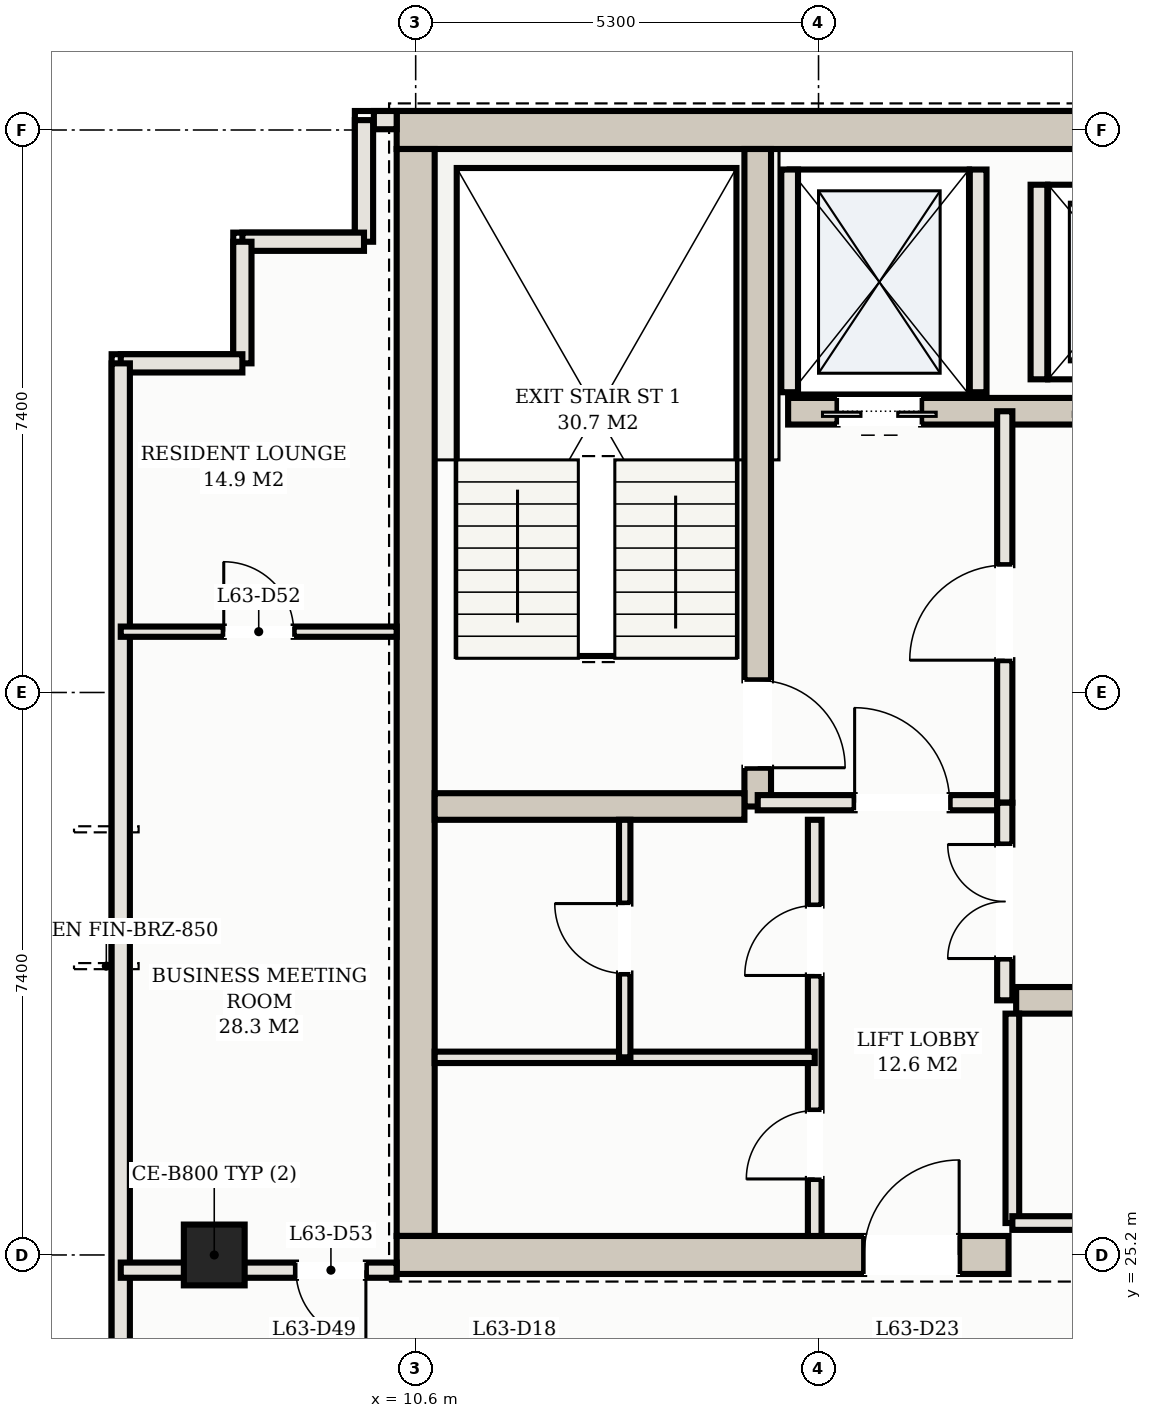
"""IFC4 building model, lengths in metres.
Left out: names, types, materials, properties, quantities, classifications, styles, units other than length and angle.
Written with IfcOpenShell. Run it as: python <this file> out.ifc"""

import sys

from ifc_helpers import new_model, si_unit, direction, frame, frame_2d, origin, origin_2d, place, context, subcontext, project, spatial, rectangle, hollow_rectangle, extrude, element, fill, save


model = new_model("IFC4")
c1 = context("Model", 3, precision=1e-05, world=origin(), true_north=direction((0.0, 1.0)))
c2 = subcontext(c1, "Body", "Model", "MODEL_VIEW")
j1 = project(units=[si_unit("LENGTHUNIT", "METRE"), si_unit("PLANEANGLEUNIT", "RADIAN")], contexts=[c1])
p1 = place(None, origin())
s1 = spatial("IfcSite", under=j1, at=p1, CompositionType="ELEMENT")
p2 = place(p1, origin())
s2 = spatial("IfcBuilding", under=s1, at=p2, CompositionType="ELEMENT")
p3 = place(p2, frame((0.0, 0.0, 229.7)))
s3 = spatial("IfcBuildingStorey", under=s2, at=p3, CompositionType="ELEMENT", Elevation=229.7)
p4 = place(p3, frame((10.35, 40.0, 0.0), z_axis=(0.0, 0.0, 1.0), x_axis=(1.0, 0.0, 0.0)))
e1 = element("IfcWall", 1, at=p4, inside=s3, PredefinedType="SHEAR", context=c2, shape_type="SweptSolid", body=[
    extrude(rectangle(XDim=32.3, YDim=0.5, at=frame_2d((16.15, 0.0))), origin(), (0.0, 0.0, 1.0), 3.11),
])
p5 = place(p3, frame((10.6, 25.45, 0.0), z_axis=(0.0, 0.0, 1.0), x_axis=(0.0, 1.0, 0.0)))
e2 = element("IfcWall", 2, at=p5, inside=s3, PredefinedType="SHEAR", context=c2, shape_type="SweptSolid", body=[
    extrude(rectangle(XDim=14.3, YDim=0.5, at=frame_2d((7.15, 0.0))), origin(), (0.0, 0.0, 1.0), 3.11),
])
p6 = place(p3, frame((10.35, 25.2, 0.0), z_axis=(0.0, 0.0, 1.0), x_axis=(1.0, 0.0, 0.0)))
e3 = element("IfcWall", 3, at=p6, inside=s3, PredefinedType="SHEAR", context=c2, shape_type="SweptSolid", body=[
    extrude(rectangle(XDim=8.05, YDim=0.5, at=frame_2d((4.025, 0.0))), origin(), (0.0, 0.0, 1.0), 3.11),
])
p7 = place(p6, frame((6.15, 0.0, 0.0)))
e4 = element("IfcOpeningElement", 4, at=p7, cuts=e3, PredefinedType="OPENING", context=c2, shape_type="SweptSolid", body=[
    extrude(rectangle(XDim=1.25, YDim=2.2, at=frame_2d((0.625, 1.1))), frame((0.0, 0.26, 0.0), z_axis=(0.0, -1.0, 0.0), x_axis=(1.0, 0.0, 0.0)), (0.0, 0.0, 1.0), 0.52),
])
p8 = place(p3, frame((15.1, 31.1, 0.0), z_axis=(0.0, 0.0, 1.0), x_axis=(0.0, 1.0, 0.0)))
e5 = element("IfcWall", 5, at=p8, inside=s3, PredefinedType="SHEAR", context=c2, shape_type="SweptSolid", body=[
    extrude(rectangle(XDim=8.65, YDim=0.35, at=frame_2d((4.325, 0.0))), origin(), (0.0, 0.0, 1.0), 3.11),
])
p9 = place(p8, frame((0.51, 0.0, 0.0)))
e6 = element("IfcOpeningElement", 6, at=p9, cuts=e5, PredefinedType="OPENING", context=c2, shape_type="SweptSolid", body=[
    extrude(rectangle(XDim=1.15, YDim=2.2, at=frame_2d((0.575, 1.1))), frame((0.0, 0.185, 0.0), z_axis=(0.0, -1.0, 0.0), x_axis=(1.0, 0.0, 0.0)), (0.0, 0.0, 1.0), 0.37),
])
p10 = place(p3, frame((10.85, 31.1, 0.0), z_axis=(0.0, 0.0, 1.0), x_axis=(1.0, 0.0, 0.0)))
e7 = element("IfcWall", 7, at=p10, inside=s3, PredefinedType="SHEAR", context=c2, shape_type="SweptSolid", body=[
    extrude(rectangle(XDim=4.075, YDim=0.35, at=frame_2d((2.038, 0.0))), origin(), (0.0, 0.0, 1.0), 3.11),
])
p11 = place(p3, frame((15.5, 36.3, 0.0), z_axis=(0.0, 0.0, 1.0), x_axis=(1.0, 0.0, 0.0)))
e8 = element("IfcWall", 8, at=p11, inside=s3, PredefinedType="SHEAR", context=c2, shape_type="SweptSolid", body=[
    extrude(rectangle(XDim=22.0, YDim=0.35, at=frame_2d((11.0, 0.0))), origin(), (0.0, 0.0, 1.0), 3.11),
])
p12 = place(p11, frame((0.65, 0.0, 0.0)))
e9 = element("IfcOpeningElement", 9, at=p12, cuts=e8, PredefinedType="OPENING", context=c2, shape_type="SweptSolid", body=[
    extrude(rectangle(XDim=1.1, YDim=2.15, at=frame_2d((0.55, 1.075))), frame((0.0, 0.185, 0.0), z_axis=(0.0, -1.0, 0.0), x_axis=(1.0, 0.0, 0.0)), (0.0, 0.0, 1.0), 0.37),
])
p13 = place(p11, frame((20.25, 0.0, 0.0)))
e10 = element("IfcOpeningElement", 10, at=p13, cuts=e8, PredefinedType="OPENING", context=c2, shape_type="SweptSolid", body=[
    extrude(rectangle(XDim=1.1, YDim=2.15, at=frame_2d((0.55, 1.075))), frame((0.0, 0.185, 0.0), z_axis=(0.0, -1.0, 0.0), x_axis=(1.0, 0.0, 0.0)), (0.0, 0.0, 1.0), 0.37),
])
p14 = place(p11, frame((17.05, 0.0, 0.0)))
e11 = element("IfcOpeningElement", 11, at=p14, cuts=e8, PredefinedType="OPENING", context=c2, shape_type="SweptSolid", body=[
    extrude(rectangle(XDim=1.3, YDim=2.2, at=frame_2d((0.65, 1.1))), frame((0.0, 0.185, 0.0), z_axis=(0.0, -1.0, 0.0), x_axis=(1.0, 0.0, 0.0)), (0.0, 0.0, 1.0), 0.37),
])
p15 = place(p11, frame((3.95, 0.0, 0.0)))
e12 = element("IfcOpeningElement", 12, at=p15, cuts=e8, PredefinedType="OPENING", context=c2, shape_type="SweptSolid", body=[
    extrude(rectangle(XDim=1.1, YDim=2.15, at=frame_2d((0.55, 1.075))), frame((0.0, 0.185, 0.0), z_axis=(0.0, -1.0, 0.0), x_axis=(1.0, 0.0, 0.0)), (0.0, 0.0, 1.0), 0.37),
])
p16 = place(p11, frame((6.55, 0.0, 0.0)))
e13 = element("IfcOpeningElement", 13, at=p16, cuts=e8, PredefinedType="OPENING", context=c2, shape_type="SweptSolid", body=[
    extrude(rectangle(XDim=1.1, YDim=2.15, at=frame_2d((0.55, 1.075))), frame((0.0, 0.185, 0.0), z_axis=(0.0, -1.0, 0.0), x_axis=(1.0, 0.0, 0.0)), (0.0, 0.0, 1.0), 0.37),
])
p17 = place(p11, frame((9.15, 0.0, 0.0)))
e14 = element("IfcOpeningElement", 14, at=p17, cuts=e8, PredefinedType="OPENING", context=c2, shape_type="SweptSolid", body=[
    extrude(rectangle(XDim=1.1, YDim=2.15, at=frame_2d((0.55, 1.075))), frame((0.0, 0.185, 0.0), z_axis=(0.0, -1.0, 0.0), x_axis=(1.0, 0.0, 0.0)), (0.0, 0.0, 1.0), 0.37),
])
p18 = place(p3, frame((18.5, 28.55, 0.0), z_axis=(0.0, 0.0, 1.0), x_axis=(1.0, 0.0, 0.0)))
e15 = element("IfcWall", 15, at=p18, inside=s3, PredefinedType="SHEAR", context=c2, shape_type="SweptSolid", body=[
    extrude(rectangle(XDim=16.0, YDim=0.35, at=frame_2d((8.0, 0.0))), origin(), (0.0, 0.0, 1.0), 3.11),
])
p19 = place(p3, frame((7.95, 25.2, 0.0), z_axis=(0.0, 0.0, 1.0), x_axis=(1.0, 0.0, 0.0)))
e16 = element("IfcColumn", 16, at=p19, inside=s3, PredefinedType="COLUMN", context=c2, shape_type="SweptSolid", body=[
    extrude(hollow_rectangle(XDim=0.8, YDim=0.8, WallThickness=0.028, at=origin_2d()), origin(), (0.0, 0.0, 1.0), 3.264),
])
for number, where, z_axis, x_axis in (
    (17, (15.52, 36.55, 0.0), (0.0, 0.0, 1.0), (0.0, 1.0, 0.0)),
    (18, (18.0, 36.55, 0.0), (0.0, 0.0, 1.0), (0.0, 1.0, 0.0)),
):
    element("IfcWall", number, at=place(p3, frame(where, z_axis=z_axis, x_axis=x_axis)), inside=s3, PredefinedType="SOLIDWALL", context=c2, shape_type="SweptSolid", body=[
        extrude(rectangle(XDim=2.93, YDim=0.22, at=frame_2d((1.465, 0.0))), origin(), (0.0, 0.0, 1.0), 3.11),
    ])
p20 = place(p3, frame((18.8, 36.72, 0.0), z_axis=(0.0, 0.0, 1.0), x_axis=(0.0, 1.0, 0.0)))
e19 = element("IfcWall", 19, at=p20, inside=s3, PredefinedType="SOLIDWALL", context=c2, shape_type="SweptSolid", body=[
    extrude(rectangle(XDim=2.56, YDim=0.22, at=frame_2d((1.28, 0.0))), origin(), (0.0, 0.0, 1.0), 3.11),
])
p21 = place(p3, frame((10.35, 40.13, 0.0), z_axis=(0.0, 0.0, 1.0), x_axis=(-1.0, 0.0, 0.0)))
e20 = element("IfcWall", 20, at=p21, inside=s3, PredefinedType="SOLIDWALL", context=c2, shape_type="SweptSolid", body=[
    extrude(rectangle(XDim=0.3, YDim=0.24, at=frame_2d((0.15, 0.0))), origin(), (0.0, 0.0, 1.0), 3.11),
])
for number, where, z_axis, x_axis in (
    (21, (9.92, 40.13, 0.0), (0.0, 0.0, 1.0), (0.0, -1.0, 0.0)),
    (22, (9.92, 38.53, 0.0), (0.0, 0.0, 1.0), (-1.0, 0.0, 0.0)),
):
    element("IfcWall", number, at=place(p3, frame(where, z_axis=z_axis, x_axis=x_axis)), inside=s3, PredefinedType="SOLIDWALL", context=c2, shape_type="SweptSolid", body=[
        extrude(rectangle(XDim=1.6, YDim=0.24, at=frame_2d((0.8, 0.0))), origin(), (0.0, 0.0, 1.0), 3.11),
    ])
for number, where, z_axis, x_axis in (
    (23, (8.32, 38.53, 0.0), (0.0, 0.0, 1.0), (0.0, -1.0, 0.0)),
    (24, (8.32, 36.93, 0.0), (0.0, 0.0, 1.0), (-1.0, 0.0, 0.0)),
):
    element("IfcWall", number, at=place(p3, frame(where, z_axis=z_axis, x_axis=x_axis)), inside=s3, PredefinedType="SOLIDWALL", context=c2, shape_type="SweptSolid", body=[
        extrude(rectangle(XDim=1.6, YDim=0.24, at=frame_2d((0.8, 0.0))), origin(), (0.0, 0.0, 1.0), 3.11),
    ])
p22 = place(p3, frame((6.72, 36.93, 0.0), z_axis=(0.0, 0.0, 1.0), x_axis=(0.0, -1.0, 0.0)))
e25 = element("IfcWall", 25, at=p22, inside=s3, PredefinedType="SOLIDWALL", context=c2, shape_type="SweptSolid", body=[
    extrude(rectangle(XDim=26.41, YDim=0.24, at=frame_2d((13.205, 0.0))), origin(), (0.0, 0.0, 1.0), 3.11),
])
p23 = place(p22, frame((18.13, 0.0, 0.0)))
e26 = element("IfcOpeningElement", 26, at=p23, cuts=e25, PredefinedType="OPENING", context=c2, shape_type="SweptSolid", body=[
    extrude(rectangle(XDim=1.8, YDim=2.2, at=frame_2d((0.9, 1.1))), frame((0.0, 0.13, 0.0), z_axis=(0.0, -1.0, 0.0), x_axis=(1.0, 0.0, 0.0)), (0.0, 0.0, 1.0), 0.26),
])
p24 = place(p3, frame((15.1, 31.15, 0.0), z_axis=(0.0, 0.0, 1.0), x_axis=(1.0, 0.0, 0.0)))
e27 = element("IfcWall", 27, at=p24, inside=s3, PredefinedType="PARTITIONING", context=c2, shape_type="SweptSolid", body=[
    extrude(rectangle(XDim=3.25, YDim=0.2, at=frame_2d((1.625, 0.0))), origin(), (0.0, 0.0, 1.0), 2.43),
])
p25 = place(p24, frame((1.275, 0.0, 0.0)))
e28 = element("IfcOpeningElement", 28, at=p25, cuts=e27, PredefinedType="OPENING", context=c2, shape_type="SweptSolid", body=[
    extrude(rectangle(XDim=1.25, YDim=2.2, at=frame_2d((0.625, 1.1))), frame((0.0, 0.11, 0.0), z_axis=(0.0, -1.0, 0.0), x_axis=(1.0, 0.0, 0.0)), (0.0, 0.0, 1.0), 0.22),
])
p26 = place(p3, frame((18.35, 31.15, 0.0), z_axis=(0.0, 0.0, 1.0), x_axis=(0.0, 1.0, 0.0)))
e29 = element("IfcWall", 29, at=p26, inside=s3, PredefinedType="PARTITIONING", context=c2, shape_type="SweptSolid", body=[
    extrude(rectangle(XDim=5.15, YDim=0.2, at=frame_2d((2.575, 0.0))), origin(), (0.0, 0.0, 1.0), 2.43),
])
p27 = place(p26, frame((1.875, 0.0, 0.0)))
e30 = element("IfcOpeningElement", 30, at=p27, cuts=e29, PredefinedType="OPENING", context=c2, shape_type="SweptSolid", body=[
    extrude(rectangle(XDim=1.25, YDim=2.2, at=frame_2d((0.625, 1.1))), frame((0.0, 0.11, 0.0), z_axis=(0.0, -1.0, 0.0), x_axis=(1.0, 0.0, 0.0)), (0.0, 0.0, 1.0), 0.22),
])
p28 = place(p3, frame((15.85, 25.45, 0.0), z_axis=(0.0, 0.0, 1.0), x_axis=(0.0, 1.0, 0.0)))
e31 = element("IfcWall", 31, at=p28, inside=s3, PredefinedType="PARTITIONING", context=c2, shape_type="SweptSolid", body=[
    extrude(rectangle(XDim=5.475, YDim=0.18, at=frame_2d((2.738, 0.0))), origin(), (0.0, 0.0, 1.0), 2.43),
])
p29 = place(p28, frame((0.75, 0.0, 0.0)))
e32 = element("IfcOpeningElement", 32, at=p29, cuts=e31, PredefinedType="OPENING", context=c2, shape_type="SweptSolid", body=[
    extrude(rectangle(XDim=0.9, YDim=2.15, at=frame_2d((0.45, 1.075))), frame((0.0, 0.1, 0.0), z_axis=(0.0, -1.0, 0.0), x_axis=(1.0, 0.0, 0.0)), (0.0, 0.0, 1.0), 0.2),
])
p30 = place(p28, frame((3.427, 0.0, 0.0)))
e33 = element("IfcOpeningElement", 33, at=p30, cuts=e31, PredefinedType="OPENING", context=c2, shape_type="SweptSolid", body=[
    extrude(rectangle(XDim=0.92, YDim=2.15, at=frame_2d((0.46, 1.075))), frame((0.0, 0.1, 0.0), z_axis=(0.0, -1.0, 0.0), x_axis=(1.0, 0.0, 0.0)), (0.0, 0.0, 1.0), 0.2),
])
p31 = place(p3, frame((10.85, 27.8, 0.0), z_axis=(0.0, 0.0, 1.0), x_axis=(1.0, 0.0, 0.0)))
e34 = element("IfcWall", 34, at=p31, inside=s3, PredefinedType="PARTITIONING", context=c2, shape_type="SweptSolid", body=[
    extrude(rectangle(XDim=5.0, YDim=0.15, at=frame_2d((2.5, 0.0))), origin(), (0.0, 0.0, 1.0), 2.43),
])
p32 = place(p3, frame((13.35, 27.8, 0.0), z_axis=(0.0, 0.0, 1.0), x_axis=(0.0, 1.0, 0.0)))
e35 = element("IfcWall", 35, at=p32, inside=s3, PredefinedType="PARTITIONING", context=c2, shape_type="SweptSolid", body=[
    extrude(rectangle(XDim=3.125, YDim=0.15, at=frame_2d((1.562, 0.0))), origin(), (0.0, 0.0, 1.0), 2.43),
])
p33 = place(p32, frame((1.103, 0.0, 0.0)))
e36 = element("IfcOpeningElement", 36, at=p33, cuts=e35, PredefinedType="OPENING", context=c2, shape_type="SweptSolid", body=[
    extrude(rectangle(XDim=0.92, YDim=2.15, at=frame_2d((0.46, 1.075))), frame((0.0, 0.085, 0.0), z_axis=(0.0, -1.0, 0.0), x_axis=(1.0, 0.0, 0.0)), (0.0, 0.0, 1.0), 0.17),
])
p34 = place(p3, frame((18.35, 28.55, 0.0), z_axis=(0.0, 0.0, 1.0), x_axis=(0.0, 1.0, 0.0)))
e37 = element("IfcWall", 37, at=p34, inside=s3, PredefinedType="PARTITIONING", context=c2, shape_type="SweptSolid", body=[
    extrude(rectangle(XDim=2.6, YDim=0.2, at=frame_2d((1.3, 0.0))), origin(), (0.0, 0.0, 1.0), 2.43),
])
p35 = place(p34, frame((0.55, 0.0, 0.0)))
e38 = element("IfcOpeningElement", 38, at=p35, cuts=e37, PredefinedType="OPENING", context=c2, shape_type="SweptSolid", body=[
    extrude(rectangle(XDim=1.5, YDim=2.25, at=frame_2d((0.75, 1.125))), frame((0.0, 0.11, 0.0), z_axis=(0.0, -1.0, 0.0), x_axis=(1.0, 0.0, 0.0)), (0.0, 0.0, 1.0), 0.22),
])
p36 = place(p3, frame((18.45, 25.62, 0.0), z_axis=(0.0, 0.0, 1.0), x_axis=(0.0, 1.0, 0.0)))
e39 = element("IfcWall", 39, at=p36, inside=s3, PredefinedType="PARTITIONING", context=c2, shape_type="SweptSolid", body=[
    extrude(rectangle(XDim=2.755, YDim=0.18, at=frame_2d((1.377, 0.0))), origin(), (0.0, 0.0, 1.0), 2.43),
])
p37 = place(p3, frame((18.45, 25.62, 0.0), z_axis=(0.0, 0.0, 1.0), x_axis=(1.0, 0.0, 0.0)))
e40 = element("IfcWall", 40, at=p37, inside=s3, PredefinedType="PARTITIONING", context=c2, shape_type="SweptSolid", body=[
    extrude(rectangle(XDim=7.9, YDim=0.18, at=frame_2d((3.95, 0.0))), origin(), (0.0, 0.0, 1.0), 2.43),
])
p38 = place(p37, frame((3.34, 0.0, 0.0)))
e41 = element("IfcOpeningElement", 41, at=p38, cuts=e40, PredefinedType="OPENING", context=c2, shape_type="SweptSolid", body=[
    extrude(rectangle(XDim=0.92, YDim=2.15, at=frame_2d((0.46, 1.075))), frame((0.0, 0.1, 0.0), z_axis=(0.0, -1.0, 0.0), x_axis=(1.0, 0.0, 0.0)), (0.0, 0.0, 1.0), 0.2),
])
p39 = place(p3, frame((6.72, 25.0, 0.0), z_axis=(0.0, 0.0, 1.0), x_axis=(1.0, 0.0, 0.0)))
e42 = element("IfcWall", 42, at=p39, inside=s3, PredefinedType="PARTITIONING", context=c2, shape_type="SweptSolid", body=[
    extrude(rectangle(XDim=3.63, YDim=0.2, at=frame_2d((1.815, 0.0))), origin(), (0.0, 0.0, 1.0), 2.43),
])
p40 = place(p39, frame((2.305, 0.0, 0.0)))
e43 = element("IfcOpeningElement", 43, at=p40, cuts=e42, PredefinedType="OPENING", context=c2, shape_type="SweptSolid", body=[
    extrude(rectangle(XDim=0.92, YDim=2.15, at=frame_2d((0.46, 1.075))), frame((0.0, 0.11, 0.0), z_axis=(0.0, -1.0, 0.0), x_axis=(1.0, 0.0, 0.0)), (0.0, 0.0, 1.0), 0.22),
])
p41 = place(p3, frame((6.72, 33.4, 0.0), z_axis=(0.0, 0.0, 1.0), x_axis=(1.0, 0.0, 0.0)))
e44 = element("IfcWall", 44, at=p41, inside=s3, PredefinedType="PARTITIONING", context=c2, shape_type="SweptSolid", body=[
    extrude(rectangle(XDim=3.63, YDim=0.135, at=frame_2d((1.815, 0.0))), origin(), (0.0, 0.0, 1.0), 2.43),
])
p42 = place(p41, frame((1.355, 0.0, 0.0)))
e45 = element("IfcOpeningElement", 45, at=p42, cuts=e44, PredefinedType="OPENING", context=c2, shape_type="SweptSolid", body=[
    extrude(rectangle(XDim=0.92, YDim=2.15, at=frame_2d((0.46, 1.075))), frame((0.0, 0.078, 0.0), z_axis=(0.0, -1.0, 0.0), x_axis=(1.0, 0.0, 0.0)), (0.0, 0.0, 1.0), 0.155),
])
p43 = place(p12, frame((1.1, 0.0, 0.0), z_axis=(0.0, 0.0, 1.0), x_axis=(-1.0, 0.0, 0.0)))
e46 = element("IfcDoor", 46, at=p43, inside=s3, OperationType="DOUBLE_DOOR_SLIDING", PredefinedType="DOOR", context=c2, shape_type="SweptSolid", body=[
    extrude(rectangle(XDim=1.1, YDim=2.15, at=frame_2d((0.55, 1.075))), frame((0.0, 0.025, 0.0), z_axis=(0.0, -1.0, 0.0), x_axis=(1.0, 0.0, 0.0)), (0.0, 0.0, 1.0), 0.05),
])
fill(e9, e46)
p44 = place(p7, origin())
e47 = element("IfcDoor", 47, at=p44, inside=s3, OperationType="SINGLE_SWING_RIGHT", PredefinedType="DOOR", context=c2, shape_type="SweptSolid", body=[
    extrude(rectangle(XDim=1.25, YDim=2.2, at=frame_2d((0.625, 1.1))), frame((0.0, 0.025, 0.0), z_axis=(0.0, -1.0, 0.0), x_axis=(1.0, 0.0, 0.0)), (0.0, 0.0, 1.0), 0.05),
])
fill(e4, e47)
p45 = place(p25, origin())
e48 = element("IfcDoor", 48, at=p45, inside=s3, OperationType="SINGLE_SWING_LEFT", PredefinedType="DOOR", context=c2, shape_type="SweptSolid", body=[
    extrude(rectangle(XDim=1.25, YDim=2.2, at=frame_2d((0.625, 1.1))), frame((0.0, 0.025, 0.0), z_axis=(0.0, -1.0, 0.0), x_axis=(1.0, 0.0, 0.0)), (0.0, 0.0, 1.0), 0.05),
])
fill(e28, e48)
p46 = place(p27, origin())
e49 = element("IfcDoor", 49, at=p46, inside=s3, OperationType="SINGLE_SWING_LEFT", PredefinedType="DOOR", context=c2, shape_type="SweptSolid", body=[
    extrude(rectangle(XDim=1.25, YDim=2.2, at=frame_2d((0.625, 1.1))), frame((0.0, 0.025, 0.0), z_axis=(0.0, -1.0, 0.0), x_axis=(1.0, 0.0, 0.0)), (0.0, 0.0, 1.0), 0.05),
])
fill(e30, e49)
p47 = place(p9, frame((1.15, 0.0, 0.0), z_axis=(0.0, 0.0, 1.0), x_axis=(-1.0, 0.0, 0.0)))
e50 = element("IfcDoor", 50, at=p47, inside=s3, OperationType="SINGLE_SWING_RIGHT", PredefinedType="DOOR", context=c2, shape_type="SweptSolid", body=[
    extrude(rectangle(XDim=1.15, YDim=2.2, at=frame_2d((0.575, 1.1))), frame((0.0, 0.025, 0.0), z_axis=(0.0, -1.0, 0.0), x_axis=(1.0, 0.0, 0.0)), (0.0, 0.0, 1.0), 0.05),
])
fill(e6, e50)
p48 = place(p29, origin())
e51 = element("IfcDoor", 51, at=p48, inside=s3, OperationType="SINGLE_SWING_LEFT", PredefinedType="DOOR", context=c2, shape_type="SweptSolid", body=[
    extrude(rectangle(XDim=0.9, YDim=2.15, at=frame_2d((0.45, 1.075))), frame((0.0, 0.025, 0.0), z_axis=(0.0, -1.0, 0.0), x_axis=(1.0, 0.0, 0.0)), (0.0, 0.0, 1.0), 0.05),
])
fill(e32, e51)
p49 = place(p30, origin())
e52 = element("IfcDoor", 52, at=p49, inside=s3, OperationType="SINGLE_SWING_LEFT", PredefinedType="DOOR", context=c2, shape_type="SweptSolid", body=[
    extrude(rectangle(XDim=0.92, YDim=2.15, at=frame_2d((0.46, 1.075))), frame((0.0, 0.025, 0.0), z_axis=(0.0, -1.0, 0.0), x_axis=(1.0, 0.0, 0.0)), (0.0, 0.0, 1.0), 0.05),
])
fill(e33, e52)
p50 = place(p33, origin())
e53 = element("IfcDoor", 53, at=p50, inside=s3, OperationType="SINGLE_SWING_RIGHT", PredefinedType="DOOR", context=c2, shape_type="SweptSolid", body=[
    extrude(rectangle(XDim=0.92, YDim=2.15, at=frame_2d((0.46, 1.075))), frame((0.0, 0.025, 0.0), z_axis=(0.0, -1.0, 0.0), x_axis=(1.0, 0.0, 0.0)), (0.0, 0.0, 1.0), 0.05),
])
fill(e36, e53)
p51 = place(p35, origin())
e54 = element("IfcDoor", 54, at=p51, inside=s3, OperationType="DOUBLE_DOOR_SINGLE_SWING", PredefinedType="DOOR", context=c2, shape_type="SweptSolid", body=[
    extrude(rectangle(XDim=1.5, YDim=2.25, at=frame_2d((0.75, 1.125))), frame((0.0, 0.025, 0.0), z_axis=(0.0, -1.0, 0.0), x_axis=(1.0, 0.0, 0.0)), (0.0, 0.0, 1.0), 0.05),
])
fill(e38, e54)
p52 = place(p42, origin())
e55 = element("IfcDoor", 55, at=p52, inside=s3, OperationType="SINGLE_SWING_LEFT", PredefinedType="DOOR", context=c2, shape_type="SweptSolid", body=[
    extrude(rectangle(XDim=0.92, YDim=2.15, at=frame_2d((0.46, 1.075))), frame((0.0, 0.025, 0.0), z_axis=(0.0, -1.0, 0.0), x_axis=(1.0, 0.0, 0.0)), (0.0, 0.0, 1.0), 0.05),
])
fill(e45, e55)
p53 = place(p40, frame((0.92, 0.0, 0.0), z_axis=(0.0, 0.0, 1.0), x_axis=(-1.0, 0.0, 0.0)))
e56 = element("IfcDoor", 56, at=p53, inside=s3, OperationType="SINGLE_SWING_LEFT", PredefinedType="DOOR", context=c2, shape_type="SweptSolid", body=[
    extrude(rectangle(XDim=0.92, YDim=2.15, at=frame_2d((0.46, 1.075))), frame((0.0, 0.025, 0.0), z_axis=(0.0, -1.0, 0.0), x_axis=(1.0, 0.0, 0.0)), (0.0, 0.0, 1.0), 0.05),
])
fill(e43, e56)
save(model, sys.argv[1])
